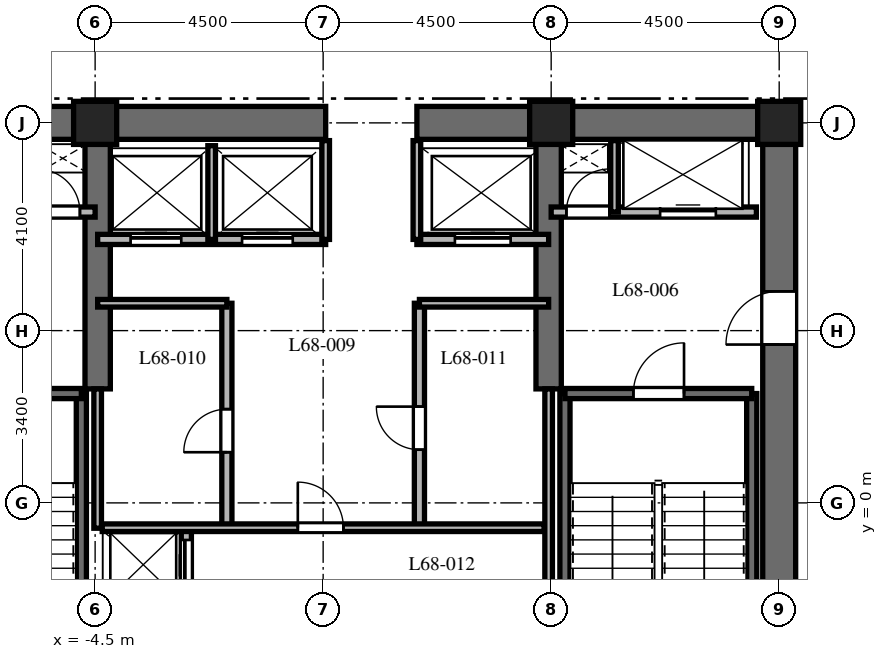
"""IFC4 building model, lengths in metres.
Left out: names, types, materials, properties, quantities, classifications, styles, units other than length and angle.
Written with IfcOpenShell. Run it as: python <this file> out.ifc"""

import sys

from ifc_helpers import new_model, si_unit, direction, frame, frame_2d, origin, origin_2d, place, context, subcontext, project, spatial, rectangle, extrude, element, fill, save


model = new_model("IFC4")
c1 = context("Model", 3, precision=1e-05, world=origin(), true_north=direction((0.0, 1.0)))
c2 = subcontext(c1, "Body", "Model", "MODEL_VIEW")
j1 = project(units=[si_unit("LENGTHUNIT", "METRE"), si_unit("PLANEANGLEUNIT", "RADIAN")], contexts=[c1])
p1 = place(None, origin())
s1 = spatial("IfcSite", under=j1, at=p1, CompositionType="ELEMENT")
p2 = place(p1, origin())
s2 = spatial("IfcBuilding", under=s1, at=p2, CompositionType="ELEMENT")
p3 = place(p2, frame((0.0, 0.0, 273.0)))
s3 = spatial("IfcBuildingStorey", under=s2, at=p3, CompositionType="ELEMENT", Elevation=273.0)
p4 = place(p3, frame((-9.325, 7.5, 0.0), z_axis=(0.0, 0.0, 1.0), x_axis=(1.0, 0.0, 0.0)))
e1 = element("IfcWall", 1, at=p4, inside=s3, PredefinedType="SHEAR", context=c2, shape_type="SweptSolid", body=[
    extrude(rectangle(XDim=9.375, YDim=0.65, at=frame_2d((4.688, 0.0))), origin(), (0.0, 0.0, 1.0), 3.9),
])
p5 = place(p3, frame((1.85, 7.5, 0.0), z_axis=(0.0, 0.0, 1.0), x_axis=(1.0, 0.0, 0.0)))
e2 = element("IfcWall", 2, at=p5, inside=s3, PredefinedType="SHEAR", context=c2, shape_type="SweptSolid", body=[
    extrude(rectangle(XDim=7.475, YDim=0.65, at=frame_2d((3.737, 0.0))), origin(), (0.0, 0.0, 1.0), 3.9),
])
p6 = place(p3, frame((9.0, -7.175, 0.0), z_axis=(0.0, 0.0, 1.0), x_axis=(0.0, 1.0, 0.0)))
e3 = element("IfcWall", 3, at=p6, inside=s3, PredefinedType="SHEAR", context=c2, shape_type="SweptSolid", body=[
    extrude(rectangle(XDim=14.35, YDim=0.65, at=frame_2d((7.175, 0.0))), origin(), (0.0, 0.0, 1.0), 3.9),
])
p7 = place(p6, frame((10.3, 0.0, 0.0)))
e4 = element("IfcOpeningElement", 4, at=p7, cuts=e3, PredefinedType="OPENING", context=c2, shape_type="SweptSolid", body=[
    extrude(rectangle(XDim=1.05, YDim=2.15, at=frame_2d((0.525, 1.075))), frame((0.0, 0.335, 0.0), z_axis=(0.0, -1.0, 0.0), x_axis=(1.0, 0.0, 0.0)), (0.0, 0.0, 1.0), 0.67),
])
for number, where, z_axis, x_axis in (
    (5, (-4.45, 2.25, 0.0), (0.0, 0.0, 1.0), (0.0, 1.0, 0.0)),
    (6, (4.45, 2.25, 0.0), (0.0, 0.0, 1.0), (0.0, 1.0, 0.0)),
):
    element("IfcWall", number, at=place(p3, frame(where, z_axis=z_axis, x_axis=x_axis)), inside=s3, PredefinedType="SHEAR", context=c2, shape_type="SweptSolid", body=[
        extrude(rectangle(XDim=4.925, YDim=0.5, at=frame_2d((2.462, 0.0))), origin(), (0.0, 0.0, 1.0), 3.9),
    ])
p8 = place(p3, frame((-4.772, -6.985, 0.0), z_axis=(0.0, 0.0, 1.0), x_axis=(0.0, 1.0, 0.0)))
e7 = element("IfcWall", 7, at=p8, inside=s3, PredefinedType="SHEAR", context=c2, shape_type="SweptSolid", body=[
    extrude(rectangle(XDim=9.143, YDim=0.2, at=frame_2d((4.572, 0.0))), origin(), (0.0, 0.0, 1.0), 3.9),
])
p9 = place(p3, frame((-8.458, 2.158, 0.0), z_axis=(0.0, 0.0, 1.0), x_axis=(1.0, 0.0, 0.0)))
e8 = element("IfcWall", 8, at=p9, inside=s3, PredefinedType="SHEAR", context=c2, shape_type="SweptSolid", body=[
    extrude(rectangle(XDim=3.686, YDim=0.2, at=frame_2d((1.843, 0.0))), origin(), (0.0, 0.0, 1.0), 3.9),
])
p10 = place(p9, frame((1.3, 0.0, 0.0)))
e9 = element("IfcOpeningElement", 9, at=p10, cuts=e8, PredefinedType="OPENING", context=c2, shape_type="SweptSolid", body=[
    extrude(rectangle(XDim=1.0, YDim=2.15, at=frame_2d((0.5, 1.075))), frame((0.0, 0.11, 0.0), z_axis=(0.0, -1.0, 0.0), x_axis=(1.0, 0.0, 0.0)), (0.0, 0.0, 1.0), 0.22),
])
for number, where, z_axis, x_axis in (
    (10, (4.772, -6.985, 0.0), (0.0, 0.0, 1.0), (0.0, 1.0, 0.0)),
    (11, (8.458, -6.985, 0.0), (0.0, 0.0, 1.0), (0.0, 1.0, 0.0)),
):
    element("IfcWall", number, at=place(p3, frame(where, z_axis=z_axis, x_axis=x_axis)), inside=s3, PredefinedType="SHEAR", context=c2, shape_type="SweptSolid", body=[
        extrude(rectangle(XDim=9.143, YDim=0.2, at=frame_2d((4.572, 0.0))), origin(), (0.0, 0.0, 1.0), 3.9),
    ])
p11 = place(p3, frame((4.772, 2.158, 0.0), z_axis=(0.0, 0.0, 1.0), x_axis=(1.0, 0.0, 0.0)))
e12 = element("IfcWall", 12, at=p11, inside=s3, PredefinedType="SHEAR", context=c2, shape_type="SweptSolid", body=[
    extrude(rectangle(XDim=3.686, YDim=0.2, at=frame_2d((1.843, 0.0))), origin(), (0.0, 0.0, 1.0), 3.9),
])
p12 = place(p11, frame((1.35, 0.0, 0.0)))
e13 = element("IfcOpeningElement", 13, at=p12, cuts=e12, PredefinedType="OPENING", context=c2, shape_type="SweptSolid", body=[
    extrude(rectangle(XDim=1.0, YDim=2.15, at=frame_2d((0.5, 1.075))), frame((0.0, 0.11, 0.0), z_axis=(0.0, -1.0, 0.0), x_axis=(1.0, 0.0, 0.0)), (0.0, 0.0, 1.0), 0.22),
])
for number, where, z_axis, x_axis in (
    (14, (9.0, 7.5, 0.0), (0.0, 0.0, 1.0), (1.0, 0.0, 0.0)),
    (15, (4.5, 7.5, 0.0), (0.0, 0.0, 1.0), (1.0, 0.0, 0.0)),
    (16, (-4.5, 7.5, 0.0), (0.0, 0.0, 1.0), (1.0, 0.0, 0.0)),
):
    element("IfcColumn", number, at=place(p3, frame(where, z_axis=z_axis, x_axis=x_axis)), inside=s3, PredefinedType="COLUMN", context=c2, shape_type="SweptSolid", body=[
        extrude(rectangle(XDim=0.85, YDim=0.85, at=origin_2d()), origin(), (0.0, 0.0, 1.0), 3.9),
    ])
p13 = place(p3, frame((-8.55, 5.74, 0.0), z_axis=(0.0, 0.0, 1.0), x_axis=(1.0, 0.0, 0.0)))
e17 = element("IfcWall", 17, at=p13, inside=s3, PredefinedType="PARTITIONING", context=c2, shape_type="SweptSolid", body=[
    extrude(rectangle(XDim=4.05, YDim=0.2, at=frame_2d((2.025, 0.0))), origin(), (0.0, 0.0, 1.0), 3.6),
])
p14 = place(p13, frame((0.75, 0.0, 0.0)))
e18 = element("IfcOpeningElement", 18, at=p14, cuts=e17, PredefinedType="OPENING", context=c2, shape_type="SweptSolid", body=[
    extrude(rectangle(XDim=1.1, YDim=2.2, at=frame_2d((0.55, 1.1))), frame((0.0, 0.11, 0.0), z_axis=(0.0, -1.0, 0.0), x_axis=(1.0, 0.0, 0.0)), (0.0, 0.0, 1.0), 0.22),
])
p15 = place(p13, frame((2.9, 0.0, 0.0)))
e19 = element("IfcOpeningElement", 19, at=p15, cuts=e17, PredefinedType="OPENING", context=c2, shape_type="SweptSolid", body=[
    extrude(rectangle(XDim=0.85, YDim=2.03, at=frame_2d((0.425, 1.015))), frame((0.0, 0.11, 0.0), z_axis=(0.0, -1.0, 0.0), x_axis=(1.0, 0.0, 0.0)), (0.0, 0.0, 1.0), 0.22),
])
p16 = place(p3, frame((4.5, 5.74, 0.0), z_axis=(0.0, 0.0, 1.0), x_axis=(1.0, 0.0, 0.0)))
e20 = element("IfcWall", 20, at=p16, inside=s3, PredefinedType="PARTITIONING", context=c2, shape_type="SweptSolid", body=[
    extrude(rectangle(XDim=4.05, YDim=0.2, at=frame_2d((2.025, 0.0))), origin(), (0.0, 0.0, 1.0), 3.6),
])
p17 = place(p16, frame((0.3, 0.0, 0.0)))
e21 = element("IfcOpeningElement", 21, at=p17, cuts=e20, PredefinedType="OPENING", context=c2, shape_type="SweptSolid", body=[
    extrude(rectangle(XDim=0.85, YDim=2.03, at=frame_2d((0.425, 1.015))), frame((0.0, 0.11, 0.0), z_axis=(0.0, -1.0, 0.0), x_axis=(1.0, 0.0, 0.0)), (0.0, 0.0, 1.0), 0.22),
])
p18 = place(p16, frame((2.15, 0.0, 0.0)))
e22 = element("IfcOpeningElement", 22, at=p18, cuts=e20, PredefinedType="OPENING", context=c2, shape_type="SweptSolid", body=[
    extrude(rectangle(XDim=1.1, YDim=2.2, at=frame_2d((0.55, 1.1))), frame((0.0, 0.11, 0.0), z_axis=(0.0, -1.0, 0.0), x_axis=(1.0, 0.0, 0.0)), (0.0, 0.0, 1.0), 0.22),
])
p19 = place(p3, frame((5.75, 5.74, 0.0), z_axis=(0.0, 0.0, 1.0), x_axis=(0.0, 1.0, 0.0)))
e23 = element("IfcWall", 23, at=p19, inside=s3, PredefinedType="PARTITIONING", context=c2, shape_type="SweptSolid", body=[
    extrude(rectangle(XDim=1.41, YDim=0.15, at=frame_2d((0.705, 0.0))), origin(), (0.0, 0.0, 1.0), 3.6),
])
p20 = place(p3, frame((-2.7, -1.972, 0.0), z_axis=(0.0, 0.0, 1.0), x_axis=(0.0, 1.0, 0.0)))
e24 = element("IfcWall", 24, at=p20, inside=s3, PredefinedType="PARTITIONING", context=c2, shape_type="SweptSolid", body=[
    extrude(rectangle(XDim=1.472, YDim=0.2, at=frame_2d((0.736, 0.0))), origin(), (0.0, 0.0, 1.0), 3.6),
])
p21 = place(p20, frame((0.24, 0.0, 0.0)))
e25 = element("IfcOpeningElement", 25, at=p21, cuts=e24, PredefinedType="OPENING", context=c2, shape_type="SweptSolid", body=[
    extrude(rectangle(XDim=1.0, YDim=2.2, at=frame_2d((0.5, 1.1))), frame((0.0, 0.11, 0.0), z_axis=(0.0, -1.0, 0.0), x_axis=(1.0, 0.0, 0.0)), (0.0, 0.0, 1.0), 0.22),
])
p22 = place(p3, frame((-4.45, 5.2, 0.0), z_axis=(0.0, 0.0, 1.0), x_axis=(1.0, 0.0, 0.0)))
e26 = element("IfcWall", 26, at=p22, inside=s3, PredefinedType="PARTITIONING", context=c2, shape_type="SweptSolid", body=[
    extrude(rectangle(XDim=4.5, YDim=0.2, at=frame_2d((2.25, 0.0))), origin(), (0.0, 0.0, 1.0), 3.6),
])
p23 = place(p22, frame((0.65, 0.0, 0.0)))
e27 = element("IfcOpeningElement", 27, at=p23, cuts=e26, PredefinedType="OPENING", context=c2, shape_type="SweptSolid", body=[
    extrude(rectangle(XDim=1.0, YDim=2.2, at=frame_2d((0.5, 1.1))), frame((0.0, 0.11, 0.0), z_axis=(0.0, -1.0, 0.0), x_axis=(1.0, 0.0, 0.0)), (0.0, 0.0, 1.0), 0.22),
])
p24 = place(p22, frame((2.85, 0.0, 0.0)))
e28 = element("IfcOpeningElement", 28, at=p24, cuts=e26, PredefinedType="OPENING", context=c2, shape_type="SweptSolid", body=[
    extrude(rectangle(XDim=1.0, YDim=2.2, at=frame_2d((0.5, 1.1))), frame((0.0, 0.11, 0.0), z_axis=(0.0, -1.0, 0.0), x_axis=(1.0, 0.0, 0.0)), (0.0, 0.0, 1.0), 0.22),
])
p25 = place(p3, frame((1.85, 5.2, 0.0), z_axis=(0.0, 0.0, 1.0), x_axis=(1.0, 0.0, 0.0)))
e29 = element("IfcWall", 29, at=p25, inside=s3, PredefinedType="PARTITIONING", context=c2, shape_type="SweptSolid", body=[
    extrude(rectangle(XDim=2.6, YDim=0.2, at=frame_2d((1.3, 0.0))), origin(), (0.0, 0.0, 1.0), 3.6),
])
p26 = place(p25, frame((0.75, 0.0, 0.0)))
e30 = element("IfcOpeningElement", 30, at=p26, cuts=e29, PredefinedType="OPENING", context=c2, shape_type="SweptSolid", body=[
    extrude(rectangle(XDim=1.1, YDim=2.2, at=frame_2d((0.55, 1.1))), frame((0.0, 0.11, 0.0), z_axis=(0.0, -1.0, 0.0), x_axis=(1.0, 0.0, 0.0)), (0.0, 0.0, 1.0), 0.22),
])
p27 = place(p3, frame((-2.2, 5.2, 0.0), z_axis=(0.0, 0.0, 1.0), x_axis=(0.0, 1.0, 0.0)))
e31 = element("IfcWall", 31, at=p27, inside=s3, PredefinedType="PARTITIONING", context=c2, shape_type="SweptSolid", body=[
    extrude(rectangle(XDim=1.85, YDim=0.15, at=frame_2d((0.925, 0.0))), origin(), (0.0, 0.0, 1.0), 3.6),
])
for number, where, z_axis, x_axis in (
    (32, (0.05, 5.2, 0.0), (0.0, 0.0, 1.0), (0.0, 1.0, 0.0)),
    (33, (1.85, 5.2, 0.0), (0.0, 0.0, 1.0), (0.0, 1.0, 0.0)),
):
    element("IfcWall", number, at=place(p3, frame(where, z_axis=z_axis, x_axis=x_axis)), inside=s3, PredefinedType="PARTITIONING", context=c2, shape_type="SweptSolid", body=[
        extrude(rectangle(XDim=1.95, YDim=0.15, at=frame_2d((0.975, 0.0))), origin(), (0.0, 0.0, 1.0), 3.6),
    ])
p28 = place(p3, frame((-4.45, -0.5, 0.0), z_axis=(0.0, 0.0, 1.0), x_axis=(0.0, 1.0, 0.0)))
e34 = element("IfcWall", 34, at=p28, inside=s3, PredefinedType="PARTITIONING", context=c2, shape_type="SweptSolid", body=[
    extrude(rectangle(XDim=2.75, YDim=0.15, at=frame_2d((1.375, 0.0))), origin(), (0.0, 0.0, 1.0), 3.6),
])
p29 = place(p3, frame((4.45, -1.972, 0.0), z_axis=(0.0, 0.0, 1.0), x_axis=(0.0, 1.0, 0.0)))
e35 = element("IfcWall", 35, at=p29, inside=s3, PredefinedType="PARTITIONING", context=c2, shape_type="SweptSolid", body=[
    extrude(rectangle(XDim=4.222, YDim=0.15, at=frame_2d((2.111, 0.0))), origin(), (0.0, 0.0, 1.0), 3.6),
])
p30 = place(p3, frame((-1.9, -0.5, 0.0), z_axis=(0.0, 0.0, 1.0), x_axis=(0.0, 1.0, 0.0)))
e36 = element("IfcWall", 36, at=p30, inside=s3, PredefinedType="PARTITIONING", context=c2, shape_type="SweptSolid", body=[
    extrude(rectangle(XDim=4.44, YDim=0.2, at=frame_2d((2.22, 0.0))), origin(), (0.0, 0.0, 1.0), 3.6),
])
p31 = place(p30, frame((1.5, 0.0, 0.0)))
e37 = element("IfcOpeningElement", 37, at=p31, cuts=e36, PredefinedType="OPENING", context=c2, shape_type="SweptSolid", body=[
    extrude(rectangle(XDim=0.85, YDim=2.03, at=frame_2d((0.425, 1.015))), frame((0.0, 0.11, 0.0), z_axis=(0.0, -1.0, 0.0), x_axis=(1.0, 0.0, 0.0)), (0.0, 0.0, 1.0), 0.22),
])
p32 = place(p3, frame((-4.45, 3.94, 0.0), z_axis=(0.0, 0.0, 1.0), x_axis=(1.0, 0.0, 0.0)))
e38 = element("IfcWall", 38, at=p32, inside=s3, PredefinedType="PARTITIONING", context=c2, shape_type="SweptSolid", body=[
    extrude(rectangle(XDim=2.55, YDim=0.15, at=frame_2d((1.275, 0.0))), origin(), (0.0, 0.0, 1.0), 3.6),
])
p33 = place(p3, frame((1.9, -0.5, 0.0), z_axis=(0.0, 0.0, 1.0), x_axis=(0.0, 1.0, 0.0)))
e39 = element("IfcWall", 39, at=p33, inside=s3, PredefinedType="PARTITIONING", context=c2, shape_type="SweptSolid", body=[
    extrude(rectangle(XDim=4.44, YDim=0.2, at=frame_2d((2.22, 0.0))), origin(), (0.0, 0.0, 1.0), 3.6),
])
p34 = place(p33, frame((1.55, 0.0, 0.0)))
e40 = element("IfcOpeningElement", 40, at=p34, cuts=e39, PredefinedType="OPENING", context=c2, shape_type="SweptSolid", body=[
    extrude(rectangle(XDim=0.85, YDim=2.03, at=frame_2d((0.425, 1.015))), frame((0.0, 0.11, 0.0), z_axis=(0.0, -1.0, 0.0), x_axis=(1.0, 0.0, 0.0)), (0.0, 0.0, 1.0), 0.22),
])
p35 = place(p3, frame((1.9, 3.94, 0.0), z_axis=(0.0, 0.0, 1.0), x_axis=(1.0, 0.0, 0.0)))
e41 = element("IfcWall", 41, at=p35, inside=s3, PredefinedType="PARTITIONING", context=c2, shape_type="SweptSolid", body=[
    extrude(rectangle(XDim=2.55, YDim=0.15, at=frame_2d((1.275, 0.0))), origin(), (0.0, 0.0, 1.0), 3.6),
])
p36 = place(p3, frame((-4.36, -0.49, 0.0), z_axis=(0.0, 0.0, 1.0), x_axis=(1.0, 0.0, 0.0)))
e42 = element("IfcWall", 42, at=p36, inside=s3, PredefinedType="PARTITIONING", context=c2, shape_type="SweptSolid", body=[
    extrude(rectangle(XDim=8.72, YDim=0.15, at=frame_2d((4.36, 0.0))), origin(), (0.0, 0.0, 1.0), 3.6),
])
p37 = place(p36, frame((3.86, 0.0, 0.0)))
e43 = element("IfcOpeningElement", 43, at=p37, cuts=e42, PredefinedType="OPENING", context=c2, shape_type="SweptSolid", body=[
    extrude(rectangle(XDim=0.9, YDim=2.03, at=frame_2d((0.45, 1.015))), frame((0.0, 0.085, 0.0), z_axis=(0.0, -1.0, 0.0), x_axis=(1.0, 0.0, 0.0)), (0.0, 0.0, 1.0), 0.17),
])
p38 = place(p12, origin())
e44 = element("IfcDoor", 44, at=p38, inside=s3, OperationType="SINGLE_SWING_RIGHT", PredefinedType="DOOR", context=c2, shape_type="SweptSolid", body=[
    extrude(rectangle(XDim=1.0, YDim=2.15, at=frame_2d((0.5, 1.075))), frame((0.0, 0.025, 0.0), z_axis=(0.0, -1.0, 0.0), x_axis=(1.0, 0.0, 0.0)), (0.0, 0.0, 1.0), 0.05),
])
fill(e13, e44)
p39 = place(p7, origin())
e45 = element("IfcDoor", 45, at=p39, inside=s3, OperationType="SINGLE_SWING_LEFT", PredefinedType="DOOR", context=c2, shape_type="SweptSolid", body=[
    extrude(rectangle(XDim=1.05, YDim=2.15, at=frame_2d((0.525, 1.075))), frame((0.0, 0.025, 0.0), z_axis=(0.0, -1.0, 0.0), x_axis=(1.0, 0.0, 0.0)), (0.0, 0.0, 1.0), 0.05),
])
fill(e4, e45)
p40 = place(p15, origin())
e46 = element("IfcDoor", 46, at=p40, inside=s3, OperationType="SINGLE_SWING_LEFT", PredefinedType="DOOR", context=c2, shape_type="SweptSolid", body=[
    extrude(rectangle(XDim=0.85, YDim=2.03, at=frame_2d((0.425, 1.015))), frame((0.0, 0.025, 0.0), z_axis=(0.0, -1.0, 0.0), x_axis=(1.0, 0.0, 0.0)), (0.0, 0.0, 1.0), 0.05),
])
fill(e19, e46)
p41 = place(p17, origin())
e47 = element("IfcDoor", 47, at=p41, inside=s3, OperationType="SINGLE_SWING_RIGHT", PredefinedType="DOOR", context=c2, shape_type="SweptSolid", body=[
    extrude(rectangle(XDim=0.85, YDim=2.03, at=frame_2d((0.425, 1.015))), frame((0.0, 0.025, 0.0), z_axis=(0.0, -1.0, 0.0), x_axis=(1.0, 0.0, 0.0)), (0.0, 0.0, 1.0), 0.05),
])
fill(e21, e47)
p42 = place(p18, origin())
e48 = element("IfcDoor", 48, at=p42, inside=s3, OperationType="SLIDING_TO_RIGHT", PredefinedType="DOOR", context=c2, shape_type="SweptSolid", body=[
    extrude(rectangle(XDim=1.1, YDim=2.2, at=frame_2d((0.55, 1.1))), frame((0.0, 0.025, 0.0), z_axis=(0.0, -1.0, 0.0), x_axis=(1.0, 0.0, 0.0)), (0.0, 0.0, 1.0), 0.05),
])
fill(e22, e48)
p43 = place(p21, origin())
e49 = element("IfcDoor", 49, at=p43, inside=s3, OperationType="SLIDING_TO_LEFT", PredefinedType="DOOR", context=c2, shape_type="SweptSolid", body=[
    extrude(rectangle(XDim=1.0, YDim=2.2, at=frame_2d((0.5, 1.1))), frame((0.0, 0.025, 0.0), z_axis=(0.0, -1.0, 0.0), x_axis=(1.0, 0.0, 0.0)), (0.0, 0.0, 1.0), 0.05),
])
fill(e25, e49)
p44 = place(p23, origin())
e50 = element("IfcDoor", 50, at=p44, inside=s3, OperationType="SLIDING_TO_LEFT", PredefinedType="DOOR", context=c2, shape_type="SweptSolid", body=[
    extrude(rectangle(XDim=1.0, YDim=2.2, at=frame_2d((0.5, 1.1))), frame((0.0, 0.025, 0.0), z_axis=(0.0, -1.0, 0.0), x_axis=(1.0, 0.0, 0.0)), (0.0, 0.0, 1.0), 0.05),
])
fill(e27, e50)
p45 = place(p24, origin())
e51 = element("IfcDoor", 51, at=p45, inside=s3, OperationType="SLIDING_TO_RIGHT", PredefinedType="DOOR", context=c2, shape_type="SweptSolid", body=[
    extrude(rectangle(XDim=1.0, YDim=2.2, at=frame_2d((0.5, 1.1))), frame((0.0, 0.025, 0.0), z_axis=(0.0, -1.0, 0.0), x_axis=(1.0, 0.0, 0.0)), (0.0, 0.0, 1.0), 0.05),
])
fill(e28, e51)
p46 = place(p26, origin())
e52 = element("IfcDoor", 52, at=p46, inside=s3, OperationType="SLIDING_TO_RIGHT", PredefinedType="DOOR", context=c2, shape_type="SweptSolid", body=[
    extrude(rectangle(XDim=1.1, YDim=2.2, at=frame_2d((0.55, 1.1))), frame((0.0, 0.025, 0.0), z_axis=(0.0, -1.0, 0.0), x_axis=(1.0, 0.0, 0.0)), (0.0, 0.0, 1.0), 0.05),
])
fill(e30, e52)
p47 = place(p31, origin())
e53 = element("IfcDoor", 53, at=p47, inside=s3, OperationType="SINGLE_SWING_LEFT", PredefinedType="DOOR", context=c2, shape_type="SweptSolid", body=[
    extrude(rectangle(XDim=0.85, YDim=2.03, at=frame_2d((0.425, 1.015))), frame((0.0, 0.025, 0.0), z_axis=(0.0, -1.0, 0.0), x_axis=(1.0, 0.0, 0.0)), (0.0, 0.0, 1.0), 0.05),
])
fill(e37, e53)
p48 = place(p34, origin())
e54 = element("IfcDoor", 54, at=p48, inside=s3, OperationType="SINGLE_SWING_RIGHT", PredefinedType="DOOR", context=c2, shape_type="SweptSolid", body=[
    extrude(rectangle(XDim=0.85, YDim=2.03, at=frame_2d((0.425, 1.015))), frame((0.0, 0.025, 0.0), z_axis=(0.0, -1.0, 0.0), x_axis=(1.0, 0.0, 0.0)), (0.0, 0.0, 1.0), 0.05),
])
fill(e40, e54)
p49 = place(p37, origin())
e55 = element("IfcDoor", 55, at=p49, inside=s3, OperationType="SINGLE_SWING_LEFT", PredefinedType="DOOR", context=c2, shape_type="SweptSolid", body=[
    extrude(rectangle(XDim=0.9, YDim=2.03, at=frame_2d((0.45, 1.015))), frame((0.0, 0.025, 0.0), z_axis=(0.0, -1.0, 0.0), x_axis=(1.0, 0.0, 0.0)), (0.0, 0.0, 1.0), 0.05),
])
fill(e43, e55)
save(model, sys.argv[1])
